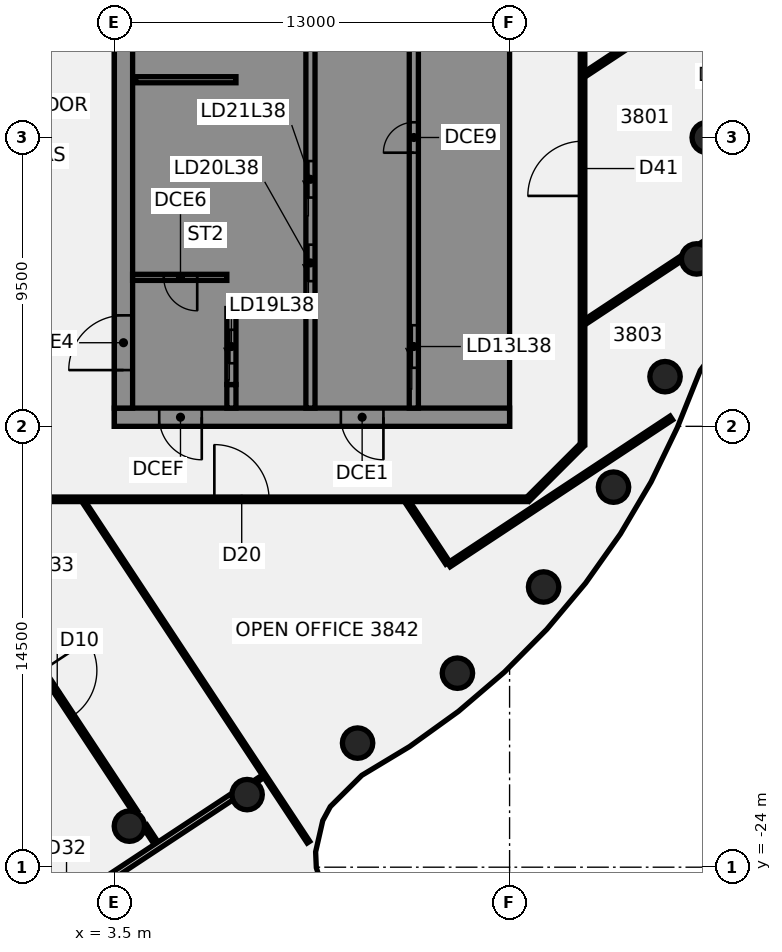
"""IFC4 building model, lengths in metres.
Left out: names, types, materials, properties, quantities, classifications, styles, units other than length and angle.
Written with IfcOpenShell. Run it as: python <this file> out.ifc"""

import sys

from ifc_helpers import new_model, si_unit, direction, frame, frame_2d, origin, origin_2d, place, context, subcontext, project, spatial, polyline, rectangle, circle, outline, extrude, element, fill, save


model = new_model("IFC4")
c1 = context("Model", 3, precision=1e-05, world=origin(), true_north=direction((0.0, 1.0)))
c2 = subcontext(c1, "Body", "Model", "MODEL_VIEW")
j1 = project(units=[si_unit("LENGTHUNIT", "METRE"), si_unit("PLANEANGLEUNIT", "RADIAN")], contexts=[c1])
p1 = place(None, origin())
s1 = spatial("IfcSite", under=j1, at=p1, CompositionType="ELEMENT")
p2 = place(p1, origin())
s2 = spatial("IfcBuilding", under=s1, at=p2, CompositionType="ELEMENT")
p3 = place(p2, frame((0.0, 0.0, 155.5)))
s3 = spatial("IfcBuildingStorey", under=s2, at=p3, CompositionType="ELEMENT", Elevation=155.5)
for number, where, z_axis, x_axis in (
    (1, (23.0, 0.0, -0.14), (0.0, 0.0, 1.0), (1.0, 0.0, 0.0)),
    (2, (3.994, -22.651, -0.14), (0.0, 0.0, 1.0), (1.0, 0.0, 0.0)),
    (3, (7.866, -21.613, -0.14), (0.0, 0.0, 1.0), (1.0, 0.0, 0.0)),
    (4, (11.5, -19.919, -0.14), (0.0, 0.0, 1.0), (1.0, 0.0, 0.0)),
    (5, (14.784, -17.619, -0.14), (0.0, 0.0, 1.0), (1.0, 0.0, 0.0)),
    (6, (17.619, -14.784, -0.14), (0.0, 0.0, 1.0), (1.0, 0.0, 0.0)),
    (7, (19.919, -11.5, -0.14), (0.0, 0.0, 1.0), (1.0, 0.0, 0.0)),
    (8, (21.613, -7.866, -0.14), (0.0, 0.0, 1.0), (1.0, 0.0, 0.0)),
    (9, (22.651, -3.994, -0.14), (0.0, 0.0, 1.0), (1.0, 0.0, 0.0)),
):
    element("IfcColumn", number, at=place(p3, frame(where, z_axis=z_axis, x_axis=x_axis)), inside=s3, PredefinedType="COLUMN", context=c2, shape_type="SweptSolid", body=[
        extrude(circle(Radius=0.5, at=origin_2d()), origin(), (0.0, 0.0, 1.0), 3.75),
    ])
p4 = place(p3, frame((-2.528, -12.0, 0.0), z_axis=(0.0, 0.0, 1.0), x_axis=(0.550950486362, -0.834537932977, 0.0)))
e10 = element("IfcWall", 10, at=p4, inside=s3, PredefinedType="PARTITIONING", context=c2, shape_type="SweptSolid", body=[
    extrude(rectangle(XDim=12.219, YDim=0.15, at=frame_2d((6.109, 0.0))), origin(), (0.0, 0.0, 1.0), 3.01),
])
p5 = place(p4, frame((6.63, 0.0, 0.0)))
e11 = element("IfcOpeningElement", 11, at=p5, cuts=e10, PredefinedType="OPENING", context=c2, shape_type="SweptSolid", body=[
    extrude(rectangle(XDim=1.8, YDim=2.1, at=frame_2d((0.9, 1.05))), frame((0.0, 0.085, 0.0), z_axis=(0.0, -1.0, 0.0), x_axis=(1.0, 0.0, 0.0)), (0.0, 0.0, 1.0), 0.17),
])
p6 = place(p3, frame((4.504, -22.651, 0.0), z_axis=(0.0, 0.0, 1.0), x_axis=(0.550659540619, -0.834729938558, 0.0)))
e12 = element("IfcWall", 12, at=p6, inside=s3, PredefinedType="PARTITIONING", context=c2, shape_type="SweptSolid", body=[
    extrude(rectangle(XDim=0.67, YDim=0.15, at=frame_2d((0.335, 0.0))), origin(), (0.0, 0.0, 1.0), 3.01),
])
p7 = place(p3, frame((2.494, -11.983, 0.0), z_axis=(0.0, 0.0, 1.0), x_axis=(0.550935265348, -0.834547981482, 0.0)))
e13 = element("IfcWall", 13, at=p7, inside=s3, PredefinedType="PARTITIONING", context=c2, shape_type="SweptSolid", body=[
    extrude(rectangle(XDim=13.413, YDim=0.1, at=frame_2d((6.707, 0.0))), origin(), (0.0, 0.0, 1.0), 3.01),
])
p8 = place(p3, frame((13.147, -12.0, 0.0), z_axis=(0.0, 0.0, 1.0), x_axis=(0.550825117354, -0.834620686355, 0.0)))
e14 = element("IfcWall", 14, at=p8, inside=s3, PredefinedType="PARTITIONING", context=c2, shape_type="SweptSolid", body=[
    extrude(rectangle(XDim=2.388, YDim=0.15, at=frame_2d((1.194, 0.0))), origin(), (0.0, 0.0, 1.0), 3.01),
])
p9 = place(p3, frame((21.684, 7.375, 0.0), z_axis=(0.0, 0.0, 1.0), x_axis=(0.550962555751, -0.834529964806, 0.0)))
e15 = element("IfcWall", 15, at=p9, inside=s3, PredefinedType="PARTITIONING", context=c2, shape_type="SweptSolid", body=[
    extrude(rectangle(XDim=13.028, YDim=0.2, at=frame_2d((6.514, 0.0))), origin(), (0.0, 0.0, 1.0), 3.01),
])
p10 = place(p9, frame((5.729, 0.0, 0.0)))
e16 = element("IfcOpeningElement", 16, at=p10, cuts=e15, PredefinedType="OPENING", context=c2, shape_type="SweptSolid", body=[
    extrude(rectangle(XDim=1.4, YDim=2.1, at=frame_2d((0.7, 1.05))), frame((0.0, 0.11, 0.0), z_axis=(0.0, -1.0, 0.0), x_axis=(1.0, 0.0, 0.0)), (0.0, 0.0, 1.0), 0.22),
])
p11 = place(p3, frame((-17.1, -11.9, 0.0), z_axis=(0.0, 0.0, 1.0), x_axis=(1.0, 0.0, 0.0)))
e17 = element("IfcWall", 17, at=p11, inside=s3, PredefinedType="PARTITIONING", context=c2, shape_type="SweptSolid", body=[
    extrude(rectangle(XDim=34.165, YDim=0.15, at=frame_2d((17.083, 0.0))), origin(), (0.0, 0.0, 1.0), 3.01),
])
p12 = place(p11, frame((9.838, 0.0, 0.0)))
e18 = element("IfcOpeningElement", 18, at=p12, cuts=e17, PredefinedType="OPENING", context=c2, shape_type="SweptSolid", body=[
    extrude(rectangle(XDim=1.8, YDim=2.1, at=frame_2d((0.9, 1.05))), frame((0.0, 0.085, 0.0), z_axis=(0.0, -1.0, 0.0), x_axis=(1.0, 0.0, 0.0)), (0.0, 0.0, 1.0), 0.17),
])
p13 = place(p11, frame((3.45, 0.0, 0.0)))
e19 = element("IfcOpeningElement", 19, at=p13, cuts=e17, PredefinedType="OPENING", context=c2, shape_type="SweptSolid", body=[
    extrude(rectangle(XDim=1.8, YDim=2.1, at=frame_2d((0.9, 1.05))), frame((0.0, 0.085, 0.0), z_axis=(0.0, -1.0, 0.0), x_axis=(1.0, 0.0, 0.0)), (0.0, 0.0, 1.0), 0.17),
])
p14 = place(p11, frame((23.889, 0.0, 0.0)))
e20 = element("IfcOpeningElement", 20, at=p14, cuts=e17, PredefinedType="OPENING", context=c2, shape_type="SweptSolid", body=[
    extrude(rectangle(XDim=1.8, YDim=2.1, at=frame_2d((0.9, 1.05))), frame((0.0, 0.085, 0.0), z_axis=(0.0, -1.0, 0.0), x_axis=(1.0, 0.0, 0.0)), (0.0, 0.0, 1.0), 0.17),
])
p15 = place(p3, frame((-3.497, -28.862, 0.0), z_axis=(0.0, 0.0, 1.0), x_axis=(0.834472576174, 0.551049471112, 0.0)))
e21 = element("IfcWall", 21, at=p15, inside=s3, PredefinedType="PARTITIONING", context=c2, shape_type="SweptSolid", body=[
    extrude(rectangle(XDim=13.029, YDim=0.2, at=frame_2d((6.514, 0.0))), origin(), (0.0, 0.0, 1.0), 3.01),
])
p16 = place(p15, frame((5.799, 0.0, 0.0)))
e22 = element("IfcOpeningElement", 22, at=p16, cuts=e21, PredefinedType="OPENING", context=c2, shape_type="SweptSolid", body=[
    extrude(rectangle(XDim=1.4, YDim=2.1, at=frame_2d((0.7, 1.05))), frame((0.0, 0.11, 0.0), z_axis=(0.0, -1.0, 0.0), x_axis=(1.0, 0.0, 0.0)), (0.0, 0.0, 1.0), 0.22),
])
p17 = place(p3, frame((8.133, -21.183, 0.0), z_axis=(0.0, 0.0, 1.0), x_axis=(0.834566293678, 0.550907525321, 0.0)))
e23 = element("IfcWall", 23, at=p17, inside=s3, PredefinedType="PARTITIONING", context=c2, shape_type="SweptSolid", body=[
    extrude(rectangle(XDim=0.312, YDim=0.1, at=frame_2d((0.156, 0.0))), origin(), (0.0, 0.0, 1.0), 3.01),
])
p18 = place(p3, frame((14.504, -14.056, 0.0), z_axis=(0.0, 0.0, 1.0), x_axis=(0.83453104674, 0.550960916969, 0.0)))
e24 = element("IfcWall", 24, at=p18, inside=s3, PredefinedType="PARTITIONING", context=c2, shape_type="SweptSolid", body=[
    extrude(rectangle(XDim=8.767, YDim=0.15, at=frame_2d((4.384, 0.0))), origin(), (0.0, 0.0, 1.0), 3.01),
])
p19 = place(p3, frame((19.0, -6.055, 0.0), z_axis=(0.0, 0.0, 1.0), x_axis=(0.834514075332, 0.550986622409, 0.0)))
e25 = element("IfcWall", 25, at=p19, inside=s3, PredefinedType="PARTITIONING", context=c2, shape_type="SweptSolid", body=[
    extrude(rectangle(XDim=3.768, YDim=0.15, at=frame_2d((1.884, 0.0))), origin(), (0.0, 0.0, 1.0), 3.01),
])
p20 = place(p3, frame((22.824, -3.53, 0.0), z_axis=(0.0, 0.0, 1.0), x_axis=(0.834519729805, 0.550978058152, 0.0)))
e26 = element("IfcWall", 26, at=p20, inside=s3, PredefinedType="PARTITIONING", context=c2, shape_type="SweptSolid", body=[
    extrude(rectangle(XDim=4.957, YDim=0.15, at=frame_2d((2.479, 0.0))), origin(), (0.0, 0.0, 1.0), 3.01),
])
p21 = place(p20, frame((2.7, 0.0, 0.0)))
e27 = element("IfcOpeningElement", 27, at=p21, cuts=e26, PredefinedType="OPENING", context=c2, shape_type="SweptSolid", body=[
    extrude(rectangle(XDim=0.9, YDim=2.1, at=frame_2d((0.45, 1.05))), frame((0.0, 0.085, 0.0), z_axis=(0.0, -1.0, 0.0), x_axis=(1.0, 0.0, 0.0)), (0.0, 0.0, 1.0), 0.17),
])
p22 = place(p3, frame((19.0, 2.093, 0.0), z_axis=(0.0, 0.0, 1.0), x_axis=(0.834493361806, 0.551017993446, 0.0)))
e28 = element("IfcWall", 28, at=p22, inside=s3, PredefinedType="PARTITIONING", context=c2, shape_type="SweptSolid", body=[
    extrude(rectangle(XDim=3.831, YDim=0.15, at=frame_2d((1.916, 0.0))), origin(), (0.0, 0.0, 1.0), 3.01),
])
p23 = place(p3, frame((17.1, -11.9, 0.0), z_axis=(0.0, 0.0, 1.0), x_axis=(0.707106781187, 0.707106781187, 0.0)))
e29 = element("IfcWall", 29, at=p23, inside=s3, PredefinedType="PARTITIONING", context=c2, shape_type="SweptSolid", body=[
    extrude(rectangle(XDim=2.505, YDim=0.15, at=frame_2d((1.253, 0.0))), origin(), (0.0, 0.0, 1.0), 3.01),
])
p24 = place(p3, frame((18.9, -10.1, 0.0), z_axis=(0.0, 0.0, 1.0), x_axis=(0.0, 1.0, 0.0)))
e30 = element("IfcWall", 30, at=p24, inside=s3, PredefinedType="PARTITIONING", context=c2, shape_type="SweptSolid", body=[
    extrude(rectangle(XDim=20.2, YDim=0.15, at=frame_2d((10.1, 0.0))), origin(), (0.0, 0.0, 1.0), 3.01),
])
p25 = place(p24, frame((8.179, 0.0, 0.0)))
e31 = element("IfcOpeningElement", 31, at=p25, cuts=e30, PredefinedType="OPENING", context=c2, shape_type="SweptSolid", body=[
    extrude(rectangle(XDim=1.8, YDim=2.1, at=frame_2d((0.9, 1.05))), frame((0.0, 0.085, 0.0), z_axis=(0.0, -1.0, 0.0), x_axis=(1.0, 0.0, 0.0)), (0.0, 0.0, 1.0), 0.17),
])
p26 = place(p24, frame((13.627, 0.0, 0.0)))
e32 = element("IfcOpeningElement", 32, at=p26, cuts=e30, PredefinedType="OPENING", context=c2, shape_type="SweptSolid", body=[
    extrude(rectangle(XDim=0.9, YDim=2.1, at=frame_2d((0.45, 1.05))), frame((0.0, 0.085, 0.0), z_axis=(0.0, -1.0, 0.0), x_axis=(1.0, 0.0, 0.0)), (0.0, 0.0, 1.0), 0.17),
])
p27 = place(p3, frame((16.5, -9.2, 0.0), z_axis=(0.0, 0.0, 1.0), x_axis=(-1.0, 0.0, 0.0)))
e33 = element("IfcWall", 33, at=p27, inside=s3, PredefinedType="SHEAR", context=c2, shape_type="SweptSolid", body=[
    extrude(rectangle(XDim=13.0, YDim=0.6, at=frame_2d((6.5, 0.0))), origin(), (0.0, 0.0, 1.0), 3.61),
])
p28 = place(p27, frame((4.15, 0.0, 0.0)))
e34 = element("IfcOpeningElement", 34, at=p28, cuts=e33, PredefinedType="OPENING", context=c2, shape_type="SweptSolid", body=[
    extrude(rectangle(XDim=1.4, YDim=2.1, at=frame_2d((0.7, 1.05))), frame((0.0, 0.31, 0.0), z_axis=(0.0, -1.0, 0.0), x_axis=(1.0, 0.0, 0.0)), (0.0, 0.0, 1.0), 0.62),
])
p29 = place(p27, frame((10.125, 0.0, 0.0)))
e35 = element("IfcOpeningElement", 35, at=p29, cuts=e33, PredefinedType="OPENING", context=c2, shape_type="SweptSolid", body=[
    extrude(rectangle(XDim=1.4, YDim=2.1, at=frame_2d((0.7, 1.05))), frame((0.0, 0.31, 0.0), z_axis=(0.0, -1.0, 0.0), x_axis=(1.0, 0.0, 0.0)), (0.0, 0.0, 1.0), 0.62),
])
p30 = place(p3, origin())
e36 = element("IfcWall", 36, at=p30, inside=s3, PredefinedType="SHEAR", context=c2, shape_type="SweptSolid", body=[
    extrude(outline(polyline([(13.5, -8.125), (13.5, -8.9), (15.9, -8.9), (16.5, -8.9), (16.5, 8.9), (15.9, 8.9), (13.5, 8.9), (13.5, 8.125), (15.9, 8.125), (15.9, 5.625), (13.5, 5.625), (13.5, 5.375), (15.9, 5.375), (15.9, -5.375), (13.5, -5.375), (13.5, -5.625), (15.9, -5.625), (15.9, -8.125), (13.5, -8.125)])), origin(), (0.0, 0.0, 1.0), 3.61),
])
p31 = place(p3, origin())
e37 = element("IfcWall", 37, at=p31, inside=s3, PredefinedType="SHEAR", context=c2, shape_type="SweptSolid", body=[
    extrude(outline(polyline([(9.8, -5.375), (7.5, -5.375), (7.5, -2.875), (9.8, -2.875), (9.8, -2.625), (7.5, -2.625), (7.5, -0.125), (9.8, -0.125), (9.8, 0.125), (7.5, 0.125), (7.5, 2.625), (9.8, 2.625), (9.8, 2.875), (7.5, 2.875), (7.5, 5.375), (9.8, 5.375), (9.8, 5.625), (7.5, 5.625), (7.5, 8.125), (9.8, 8.125), (9.8, 8.9), (7.5, 8.9), (7.2, 8.9), (7.2, -5.625), (7.5, -5.625), (9.8, -5.625), (9.8, -5.375)])), origin(), (0.0, 0.0, 1.0), 3.61),
])
p32 = place(p3, origin())
e38 = element("IfcWall", 38, at=p32, inside=s3, PredefinedType="SHEAR", context=c2, shape_type="SweptSolid", body=[
    extrude(outline(polyline([(7.5, -8.125), (7.5, -8.9), (9.8, -8.9), (9.8, -8.125), (9.8, -5.625), (9.55, -5.625), (9.55, -8.125), (7.5, -8.125)])), origin(), (0.0, 0.0, 1.0), 3.61),
])
p33 = place(p3, frame((7.35, -8.9, 0.0), z_axis=(0.0, 0.0, 1.0), x_axis=(0.0, 1.0, 0.0)))
e39 = element("IfcWall", 39, at=p33, inside=s3, PredefinedType="SHEAR", context=c2, shape_type="SweptSolid", body=[
    extrude(rectangle(XDim=0.775, YDim=0.3, at=frame_2d((0.387, 0.0))), origin(), (0.0, 0.0, 1.0), 3.61),
])
p34 = place(p3, frame((7.5, 1.9, 0.0), z_axis=(0.0, 0.0, 1.0), x_axis=(-1.0, 0.0, 0.0)))
e40 = element("IfcWall", 40, at=p34, inside=s3, PredefinedType="SHEAR", context=c2, shape_type="SweptSolid", body=[
    extrude(rectangle(XDim=3.3, YDim=0.2, at=frame_2d((1.65, 0.0))), origin(), (0.0, 0.0, 1.0), 3.61),
])
p35 = place(p3, frame((13.35, -8.9, 0.0), z_axis=(0.0, 0.0, 1.0), x_axis=(0.0, 1.0, 0.0)))
e41 = element("IfcWall", 41, at=p35, inside=s3, PredefinedType="SHEAR", context=c2, shape_type="SweptSolid", body=[
    extrude(rectangle(XDim=17.8, YDim=0.3, at=frame_2d((8.9, 0.0))), origin(), (0.0, 0.0, 1.0), 3.61),
])
p36 = place(p35, frame((1.325, 0.0, 0.0)))
e42 = element("IfcOpeningElement", 42, at=p36, cuts=e41, PredefinedType="OPENING", context=c2, shape_type="SweptSolid", body=[
    extrude(rectangle(XDim=1.4, YDim=2.1, at=frame_2d((0.7, 1.05))), frame((0.0, 0.16, 0.0), z_axis=(0.0, -1.0, 0.0), x_axis=(1.0, 0.0, 0.0)), (0.0, 0.0, 1.0), 0.32),
])
p37 = place(p35, frame((8.4, 0.0, 0.0)))
e43 = element("IfcOpeningElement", 43, at=p37, cuts=e41, PredefinedType="OPENING", context=c2, shape_type="SweptSolid", body=[
    extrude(rectangle(XDim=1.0, YDim=2.1, at=frame_2d((0.5, 1.05))), frame((0.0, 0.16, 0.0), z_axis=(0.0, -1.0, 0.0), x_axis=(1.0, 0.0, 0.0)), (0.0, 0.0, 1.0), 0.32),
])
p38 = place(p3, frame((9.95, -8.9, 0.0), z_axis=(0.0, 0.0, 1.0), x_axis=(0.0, 1.0, 0.0)))
e44 = element("IfcWall", 44, at=p38, inside=s3, PredefinedType="SHEAR", context=c2, shape_type="SweptSolid", body=[
    extrude(rectangle(XDim=17.8, YDim=0.3, at=frame_2d((8.9, 0.0))), origin(), (0.0, 0.0, 1.0), 3.61),
])
p39 = place(p38, frame((4.175, 0.0, 0.0)))
e45 = element("IfcOpeningElement", 45, at=p39, cuts=e44, PredefinedType="OPENING", context=c2, shape_type="SweptSolid", body=[
    extrude(rectangle(XDim=1.2, YDim=2.1, at=frame_2d((0.6, 1.05))), frame((0.0, 0.16, 0.0), z_axis=(0.0, -1.0, 0.0), x_axis=(1.0, 0.0, 0.0)), (0.0, 0.0, 1.0), 0.32),
])
p40 = place(p38, frame((6.925, 0.0, 0.0)))
e46 = element("IfcOpeningElement", 46, at=p40, cuts=e44, PredefinedType="OPENING", context=c2, shape_type="SweptSolid", body=[
    extrude(rectangle(XDim=1.2, YDim=2.1, at=frame_2d((0.6, 1.05))), frame((0.0, 0.16, 0.0), z_axis=(0.0, -1.0, 0.0), x_axis=(1.0, 0.0, 0.0)), (0.0, 0.0, 1.0), 0.32),
])
p41 = place(p3, frame((7.35, -8.125, 0.0), z_axis=(0.0, 0.0, 1.0), x_axis=(0.0, 1.0, 0.0)))
e47 = element("IfcWall", 47, at=p41, inside=s3, PredefinedType="SHEAR", context=c2, shape_type="SweptSolid", body=[
    extrude(rectangle(XDim=2.5, YDim=0.3, at=frame_2d((1.25, 0.0))), origin(), (0.0, 0.0, 1.0), 3.61),
])
p42 = place(p41, frame((0.7, 0.0, 0.0)))
e48 = element("IfcOpeningElement", 48, at=p42, cuts=e47, PredefinedType="OPENING", context=c2, shape_type="SweptSolid", body=[
    extrude(rectangle(XDim=1.1, YDim=2.1, at=frame_2d((0.55, 1.05))), frame((0.0, 0.16, 0.0), z_axis=(0.0, -1.0, 0.0), x_axis=(1.0, 0.0, 0.0)), (0.0, 0.0, 1.0), 0.32),
])
p43 = place(p3, frame((3.8, -8.9, 0.0), z_axis=(0.0, 0.0, 1.0), x_axis=(0.0, 1.0, 0.0)))
e49 = element("IfcWall", 49, at=p43, inside=s3, PredefinedType="SHEAR", context=c2, shape_type="SweptSolid", body=[
    extrude(rectangle(XDim=17.8, YDim=0.6, at=frame_2d((8.9, 0.0))), origin(), (0.0, 0.0, 1.0), 3.61),
])
p44 = place(p43, frame((1.25, 0.0, 0.0)))
e50 = element("IfcOpeningElement", 50, at=p44, cuts=e49, PredefinedType="OPENING", context=c2, shape_type="SweptSolid", body=[
    extrude(rectangle(XDim=1.8, YDim=2.1, at=frame_2d((0.9, 1.05))), frame((0.0, 0.31, 0.0), z_axis=(0.0, -1.0, 0.0), x_axis=(1.0, 0.0, 0.0)), (0.0, 0.0, 1.0), 0.62),
])
p45 = place(p43, frame((12.377, 0.0, 0.0)))
e51 = element("IfcOpeningElement", 51, at=p45, cuts=e49, PredefinedType="OPENING", context=c2, shape_type="SweptSolid", body=[
    extrude(rectangle(XDim=1.0, YDim=2.1, at=frame_2d((0.5, 1.05))), frame((0.0, 0.31, 0.0), z_axis=(0.0, -1.0, 0.0), x_axis=(1.0, 0.0, 0.0)), (0.0, 0.0, 1.0), 0.62),
])
p46 = place(p43, frame((15.903, 0.0, 0.0)))
e52 = element("IfcOpeningElement", 52, at=p46, cuts=e49, PredefinedType="OPENING", context=c2, shape_type="SweptSolid", body=[
    extrude(rectangle(XDim=1.0, YDim=2.1, at=frame_2d((0.5, 1.05))), frame((0.0, 0.31, 0.0), z_axis=(0.0, -1.0, 0.0), x_axis=(1.0, 0.0, 0.0)), (0.0, 0.0, 1.0), 0.62),
])
p47 = place(p3, frame((7.2, -4.6, 0.0), z_axis=(0.0, 0.0, 1.0), x_axis=(-1.0, 0.0, 0.0)))
e53 = element("IfcWall", 53, at=p47, inside=s3, PredefinedType="SHEAR", context=c2, shape_type="SweptSolid", body=[
    extrude(rectangle(XDim=3.1, YDim=0.2, at=frame_2d((1.55, 0.0))), origin(), (0.0, 0.0, 1.0), 3.61),
])
p48 = place(p47, frame((0.975, 0.0, 0.0)))
e54 = element("IfcOpeningElement", 54, at=p48, cuts=e53, PredefinedType="OPENING", context=c2, shape_type="SweptSolid", body=[
    extrude(rectangle(XDim=1.1, YDim=2.1, at=frame_2d((0.55, 1.05))), frame((0.0, 0.11, 0.0), z_axis=(0.0, -1.0, 0.0), x_axis=(1.0, 0.0, 0.0)), (0.0, 0.0, 1.0), 0.22),
])
p49 = place(p5, origin())
e55 = element("IfcDoor", 55, at=p49, inside=s3, OperationType="DOUBLE_DOOR_SINGLE_SWING", PredefinedType="DOOR", context=c2, shape_type="SweptSolid", body=[
    extrude(rectangle(XDim=1.8, YDim=2.1, at=frame_2d((0.9, 1.05))), frame((0.0, 0.025, 0.0), z_axis=(0.0, -1.0, 0.0), x_axis=(1.0, 0.0, 0.0)), (0.0, 0.0, 1.0), 0.05),
])
fill(e11, e55)
p50 = place(p14, frame((1.8, 0.0, 0.0), z_axis=(0.0, 0.0, 1.0), x_axis=(-1.0, 0.0, 0.0)))
e56 = element("IfcDoor", 56, at=p50, inside=s3, OperationType="DOUBLE_DOOR_SINGLE_SWING", PredefinedType="DOOR", context=c2, shape_type="SweptSolid", body=[
    extrude(rectangle(XDim=1.8, YDim=2.1, at=frame_2d((0.9, 1.05))), frame((0.0, 0.025, 0.0), z_axis=(0.0, -1.0, 0.0), x_axis=(1.0, 0.0, 0.0)), (0.0, 0.0, 1.0), 0.05),
])
fill(e20, e56)
p51 = place(p25, origin())
e57 = element("IfcDoor", 57, at=p51, inside=s3, OperationType="DOUBLE_DOOR_SINGLE_SWING", PredefinedType="DOOR", context=c2, shape_type="SweptSolid", body=[
    extrude(rectangle(XDim=1.8, YDim=2.1, at=frame_2d((0.9, 1.05))), frame((0.0, 0.025, 0.0), z_axis=(0.0, -1.0, 0.0), x_axis=(1.0, 0.0, 0.0)), (0.0, 0.0, 1.0), 0.05),
])
fill(e31, e57)
p52 = place(p28, origin())
e58 = element("IfcDoor", 58, at=p52, inside=s3, OperationType="SINGLE_SWING_LEFT", PredefinedType="DOOR", context=c2, shape_type="SweptSolid", body=[
    extrude(rectangle(XDim=1.4, YDim=2.1, at=frame_2d((0.7, 1.05))), frame((0.0, 0.025, 0.0), z_axis=(0.0, -1.0, 0.0), x_axis=(1.0, 0.0, 0.0)), (0.0, 0.0, 1.0), 0.05),
])
fill(e34, e58)
p53 = place(p29, origin())
e59 = element("IfcDoor", 59, at=p53, inside=s3, OperationType="SINGLE_SWING_LEFT", PredefinedType="DOOR", context=c2, shape_type="SweptSolid", body=[
    extrude(rectangle(XDim=1.4, YDim=2.1, at=frame_2d((0.7, 1.05))), frame((0.0, 0.025, 0.0), z_axis=(0.0, -1.0, 0.0), x_axis=(1.0, 0.0, 0.0)), (0.0, 0.0, 1.0), 0.05),
])
fill(e35, e59)
p54 = place(p44, origin())
e60 = element("IfcDoor", 60, at=p54, inside=s3, OperationType="SINGLE_SWING_LEFT", PredefinedType="DOOR", context=c2, shape_type="SweptSolid", body=[
    extrude(rectangle(XDim=1.8, YDim=2.1, at=frame_2d((0.9, 1.05))), frame((0.0, 0.025, 0.0), z_axis=(0.0, -1.0, 0.0), x_axis=(1.0, 0.0, 0.0)), (0.0, 0.0, 1.0), 0.05),
])
fill(e50, e60)
p55 = place(p48, origin())
e61 = element("IfcDoor", 61, at=p55, inside=s3, OperationType="SINGLE_SWING_LEFT", PredefinedType="DOOR", context=c2, shape_type="SweptSolid", body=[
    extrude(rectangle(XDim=1.1, YDim=2.1, at=frame_2d((0.55, 1.05))), frame((0.0, 0.025, 0.0), z_axis=(0.0, -1.0, 0.0), x_axis=(1.0, 0.0, 0.0)), (0.0, 0.0, 1.0), 0.05),
])
fill(e54, e61)
p56 = place(p36, origin())
e62 = element("IfcDoor", 62, at=p56, inside=s3, OperationType="SLIDING_TO_LEFT", PredefinedType="DOOR", context=c2, shape_type="SweptSolid", body=[
    extrude(rectangle(XDim=1.4, YDim=2.1, at=frame_2d((0.7, 1.05))), frame((0.0, 0.025, 0.0), z_axis=(0.0, -1.0, 0.0), x_axis=(1.0, 0.0, 0.0)), (0.0, 0.0, 1.0), 0.05),
])
fill(e42, e62)
p57 = place(p42, origin())
e63 = element("IfcDoor", 63, at=p57, inside=s3, OperationType="SLIDING_TO_LEFT", PredefinedType="DOOR", context=c2, shape_type="SweptSolid", body=[
    extrude(rectangle(XDim=1.1, YDim=2.1, at=frame_2d((0.55, 1.05))), frame((0.0, 0.025, 0.0), z_axis=(0.0, -1.0, 0.0), x_axis=(1.0, 0.0, 0.0)), (0.0, 0.0, 1.0), 0.05),
])
fill(e48, e63)
p58 = place(p39, origin())
e64 = element("IfcDoor", 64, at=p58, inside=s3, OperationType="SLIDING_TO_LEFT", PredefinedType="DOOR", context=c2, shape_type="SweptSolid", body=[
    extrude(rectangle(XDim=1.2, YDim=2.1, at=frame_2d((0.6, 1.05))), frame((0.0, 0.025, 0.0), z_axis=(0.0, -1.0, 0.0), x_axis=(1.0, 0.0, 0.0)), (0.0, 0.0, 1.0), 0.05),
])
fill(e45, e64)
p59 = place(p40, origin())
e65 = element("IfcDoor", 65, at=p59, inside=s3, OperationType="SLIDING_TO_LEFT", PredefinedType="DOOR", context=c2, shape_type="SweptSolid", body=[
    extrude(rectangle(XDim=1.2, YDim=2.1, at=frame_2d((0.6, 1.05))), frame((0.0, 0.025, 0.0), z_axis=(0.0, -1.0, 0.0), x_axis=(1.0, 0.0, 0.0)), (0.0, 0.0, 1.0), 0.05),
])
fill(e46, e65)
p60 = place(p37, origin())
e66 = element("IfcDoor", 66, at=p60, inside=s3, OperationType="SINGLE_SWING_LEFT", PredefinedType="DOOR", context=c2, shape_type="SweptSolid", body=[
    extrude(rectangle(XDim=1.0, YDim=2.1, at=frame_2d((0.5, 1.05))), frame((0.0, 0.025, 0.0), z_axis=(0.0, -1.0, 0.0), x_axis=(1.0, 0.0, 0.0)), (0.0, 0.0, 1.0), 0.05),
])
fill(e43, e66)
save(model, sys.argv[1])
